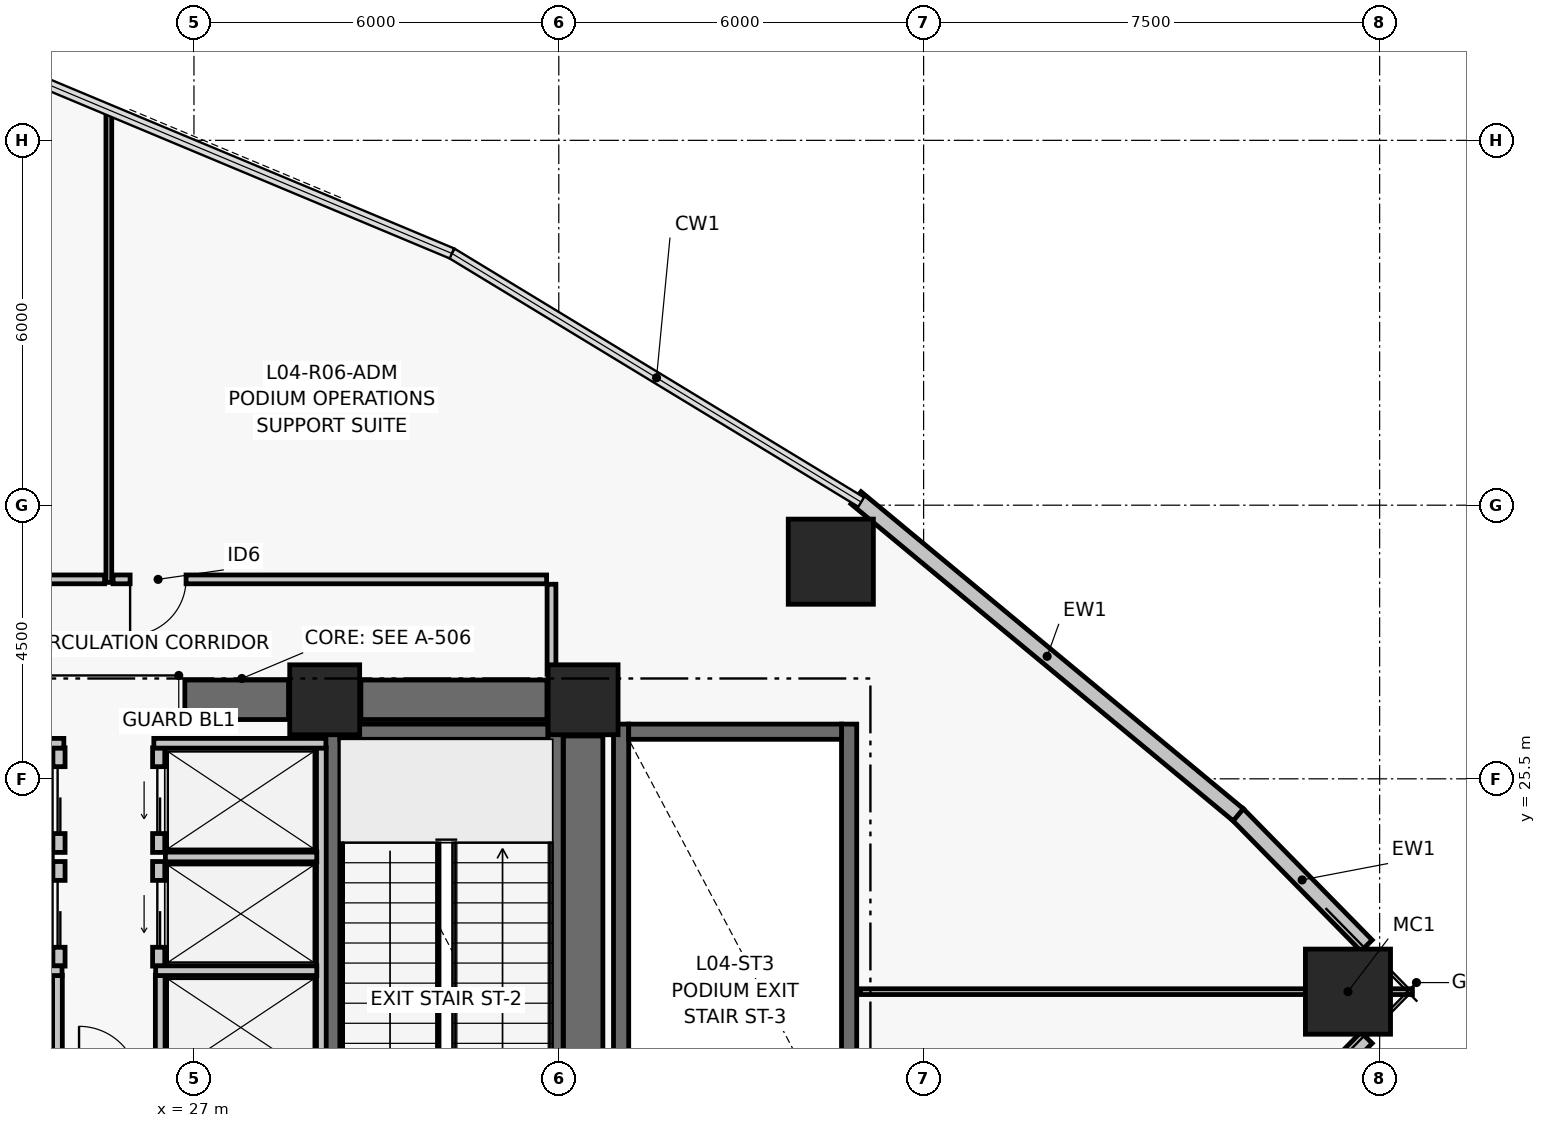
"""IFC4 building model, lengths in metres.
Left out: names, types, materials, properties, quantities, classifications, styles, units other than length and angle.
Written with IfcOpenShell. Run it as: python <this file> out.ifc"""

import sys

from ifc_helpers import new_model, si_unit, direction, frame, frame_2d, origin, origin_2d, place, context, subcontext, project, spatial, rectangle, hollow_rectangle, extrude, element, fill, save


model = new_model("IFC4")
c1 = context("Model", 3, precision=1e-05, world=origin(), true_north=direction((0.0, 1.0)))
c2 = subcontext(c1, "Body", "Model", "MODEL_VIEW")
j1 = project(units=[si_unit("LENGTHUNIT", "METRE"), si_unit("PLANEANGLEUNIT", "RADIAN")], contexts=[c1])
p1 = place(None, origin())
s1 = spatial("IfcSite", under=j1, at=p1, CompositionType="ELEMENT")
p2 = place(p1, origin())
s2 = spatial("IfcBuilding", under=s1, at=p2, CompositionType="ELEMENT")
p3 = place(p2, frame((0.0, 0.0, 22.8)))
s3 = spatial("IfcBuildingStorey", under=s2, at=p3, CompositionType="ELEMENT", Elevation=22.8)
for number, where, z_axis, x_axis in (
    (1, (29.15, 26.8, 0.0), (0.0, 0.0, 1.0), (1.0, 0.0, 0.0)),
    (2, (33.4, 26.8, 0.0), (0.0, 0.0, 1.0), (1.0, 0.0, 0.0)),
):
    element("IfcColumn", number, at=place(p3, frame(where, z_axis=z_axis, x_axis=x_axis)), inside=s3, PredefinedType="COLUMN", context=c2, shape_type="SweptSolid", body=[
        extrude(rectangle(XDim=1.15, YDim=1.15, at=origin_2d()), origin(), (0.0, 0.0, 1.0), 4.8),
    ])
p4 = place(p3, frame((26.85, 26.8, 0.0), z_axis=(0.0, 0.0, 1.0), x_axis=(1.0, 0.0, 0.0)))
e3 = element("IfcWall", 3, at=p4, inside=s3, PredefinedType="SHEAR", context=c2, shape_type="SweptSolid", body=[
    extrude(rectangle(XDim=1.705, YDim=0.65, at=frame_2d((0.853, 0.0))), origin(), (0.0, 0.0, 1.0), 4.55),
])
p5 = place(p3, frame((29.745, 26.8, 0.0), z_axis=(0.0, 0.0, 1.0), x_axis=(1.0, 0.0, 0.0)))
e4 = element("IfcWall", 4, at=p5, inside=s3, PredefinedType="SHEAR", context=c2, shape_type="SweptSolid", body=[
    extrude(rectangle(XDim=3.06, YDim=0.65, at=frame_2d((1.53, 0.0))), origin(), (0.0, 0.0, 1.0), 4.55),
])
p6 = place(p3, frame((33.4, 17.795, 0.0), z_axis=(0.0, 0.0, 1.0), x_axis=(0.0, 1.0, 0.0)))
e5 = element("IfcWall", 5, at=p6, inside=s3, PredefinedType="SHEAR", context=c2, shape_type="SweptSolid", body=[
    extrude(rectangle(XDim=8.41, YDim=0.65, at=frame_2d((4.205, 0.0))), origin(), (0.0, 0.0, 1.0), 4.55),
])
p7 = place(p3, frame((29.275, 17.6, 0.0), z_axis=(0.0, 0.0, 1.0), x_axis=(0.0, 1.0, 0.0)))
e6 = element("IfcWall", 6, at=p7, inside=s3, PredefinedType="SHEAR", context=c2, shape_type="SweptSolid", body=[
    extrude(rectangle(XDim=8.8, YDim=0.25, at=frame_2d((4.4, 0.0))), origin(), (0.0, 0.0, 1.0), 4.55),
])
p8 = place(p7, frame((0.35, 0.0, 0.0)))
e7 = element("IfcOpeningElement", 7, at=p8, cuts=e6, PredefinedType="OPENING", context=c2, shape_type="SweptSolid", body=[
    extrude(rectangle(XDim=1.05, YDim=2.08, at=frame_2d((0.525, 1.04))), frame((0.0, 0.135, 0.0), z_axis=(0.0, -1.0, 0.0), x_axis=(1.0, 0.0, 0.0)), (0.0, 0.0, 1.0), 0.27),
])
p9 = place(p3, frame((32.946, 17.6, 0.0), z_axis=(0.0, 0.0, 1.0), x_axis=(0.0, 1.0, 0.0)))
e8 = element("IfcWall", 8, at=p9, inside=s3, PredefinedType="SHEAR", context=c2, shape_type="SweptSolid", body=[
    extrude(rectangle(XDim=8.8, YDim=0.25, at=frame_2d((4.4, 0.0))), origin(), (0.0, 0.0, 1.0), 4.55),
])
p10 = place(p3, frame((29.4, 26.275, 0.0), z_axis=(0.0, 0.0, 1.0), x_axis=(1.0, 0.0, 0.0)))
e9 = element("IfcWall", 9, at=p10, inside=s3, PredefinedType="SHEAR", context=c2, shape_type="SweptSolid", body=[
    extrude(rectangle(XDim=3.421, YDim=0.25, at=frame_2d((1.71, 0.0))), origin(), (0.0, 0.0, 1.0), 4.55),
])
for number, where, z_axis, x_axis in (
    (10, (34.025, 17.6, 0.0), (0.0, 0.0, 1.0), (0.0, 1.0, 0.0)),
    (11, (37.775, 17.6, 0.0), (0.0, 0.0, 1.0), (0.0, 1.0, 0.0)),
):
    element("IfcWall", number, at=place(p3, frame(where, z_axis=z_axis, x_axis=x_axis)), inside=s3, PredefinedType="SHEAR", context=c2, shape_type="SweptSolid", body=[
        extrude(rectangle(XDim=8.8, YDim=0.25, at=frame_2d((4.4, 0.0))), origin(), (0.0, 0.0, 1.0), 4.55),
    ])
p11 = place(p3, frame((34.15, 26.275, 0.0), z_axis=(0.0, 0.0, 1.0), x_axis=(1.0, 0.0, 0.0)))
e12 = element("IfcWall", 12, at=p11, inside=s3, PredefinedType="SHEAR", context=c2, shape_type="SweptSolid", body=[
    extrude(rectangle(XDim=3.5, YDim=0.25, at=frame_2d((1.75, 0.0))), origin(), (0.0, 0.0, 1.0), 4.55),
])
for number, where, z_axis, x_axis in (
    (13, (45.979, 22.0, 0.0), (0.0, 0.0, 1.0), (1.0, 0.0, 0.0)),
    (14, (37.474, 29.071, 0.0), (0.0, 0.0, 1.0), (1.0, 0.0, 0.0)),
):
    element("IfcColumn", number, at=place(p3, frame(where, z_axis=z_axis, x_axis=x_axis)), inside=s3, PredefinedType="COLUMN", context=c2, shape_type="SweptSolid", body=[
        extrude(hollow_rectangle(XDim=1.4, YDim=1.4, WallThickness=0.055, at=origin_2d()), origin(), (0.0, 0.0, 1.0), 4.8),
    ])
for number, where, z_axis, x_axis in (
    (15, (46.285, 21.242, 0.0), (0.0, 0.0, 1.0), (-0.701, -0.714, 0.0)),
    (16, (44.166, 24.916, 0.0), (0.0, 0.0, 1.0), (0.701, -0.714, 0.0)),
):
    element("IfcWall", number, at=place(p3, frame(where, z_axis=z_axis, x_axis=x_axis)), inside=s3, PredefinedType="PARTITIONING", context=c2, shape_type="SweptSolid", body=[
        extrude(rectangle(XDim=3.024, YDim=0.26, at=frame_2d((1.512, 0.0))), origin(), (0.0, 0.0, 1.0), 4.55),
    ])
p12 = place(p3, frame((37.888, 30.121, 0.0), z_axis=(0.0, 0.0, 1.0), x_axis=(0.769752944783, -0.638341917782, 0.0)))
e17 = element("IfcWall", 17, at=p12, inside=s3, PredefinedType="PARTITIONING", context=c2, shape_type="SweptSolid", body=[
    extrude(rectangle(XDim=8.167, YDim=0.26, at=frame_2d((4.083, 0.0))), origin(), (0.0, 0.0, 1.0), 4.55),
])
p13 = place(p3, frame((24.78, 22.42, 0.0), z_axis=(0.0, 0.0, 1.0), x_axis=(0.0, 1.0, 0.0)))
e18 = element("IfcWall", 18, at=p13, inside=s3, PredefinedType="PARTITIONING", context=c2, shape_type="SweptSolid", body=[
    extrude(rectangle(XDim=1.72, YDim=0.2, at=frame_2d((0.86, 0.0))), origin(), (0.0, 0.0, 1.0), 4.55),
])
p14 = place(p13, frame((0.31, 0.0, 0.0)))
e19 = element("IfcOpeningElement", 19, at=p14, cuts=e18, PredefinedType="OPENING", context=c2, shape_type="SweptSolid", body=[
    extrude(rectangle(XDim=1.1, YDim=2.08, at=frame_2d((0.55, 1.04))), frame((0.0, 0.11, 0.0), z_axis=(0.0, -1.0, 0.0), x_axis=(1.0, 0.0, 0.0)), (0.0, 0.0, 1.0), 0.22),
])
p15 = place(p3, frame((24.78, 24.29, 0.0), z_axis=(0.0, 0.0, 1.0), x_axis=(0.0, 1.0, 0.0)))
e20 = element("IfcWall", 20, at=p15, inside=s3, PredefinedType="PARTITIONING", context=c2, shape_type="SweptSolid", body=[
    extrude(rectangle(XDim=1.72, YDim=0.2, at=frame_2d((0.86, 0.0))), origin(), (0.0, 0.0, 1.0), 4.55),
])
p16 = place(p15, frame((0.31, 0.0, 0.0)))
e21 = element("IfcOpeningElement", 21, at=p16, cuts=e20, PredefinedType="OPENING", context=c2, shape_type="SweptSolid", body=[
    extrude(rectangle(XDim=1.1, YDim=2.08, at=frame_2d((0.55, 1.04))), frame((0.0, 0.11, 0.0), z_axis=(0.0, -1.0, 0.0), x_axis=(1.0, 0.0, 0.0)), (0.0, 0.0, 1.0), 0.22),
])
p17 = place(p3, frame((26.42, 22.42, 0.0), z_axis=(0.0, 0.0, 1.0), x_axis=(0.0, 1.0, 0.0)))
e22 = element("IfcWall", 22, at=p17, inside=s3, PredefinedType="PARTITIONING", context=c2, shape_type="SweptSolid", body=[
    extrude(rectangle(XDim=1.72, YDim=0.2, at=frame_2d((0.86, 0.0))), origin(), (0.0, 0.0, 1.0), 4.55),
])
p18 = place(p17, frame((0.31, 0.0, 0.0)))
e23 = element("IfcOpeningElement", 23, at=p18, cuts=e22, PredefinedType="OPENING", context=c2, shape_type="SweptSolid", body=[
    extrude(rectangle(XDim=1.1, YDim=2.08, at=frame_2d((0.55, 1.04))), frame((0.0, 0.11, 0.0), z_axis=(0.0, -1.0, 0.0), x_axis=(1.0, 0.0, 0.0)), (0.0, 0.0, 1.0), 0.22),
])
p19 = place(p3, frame((26.42, 24.29, 0.0), z_axis=(0.0, 0.0, 1.0), x_axis=(0.0, 1.0, 0.0)))
e24 = element("IfcWall", 24, at=p19, inside=s3, PredefinedType="PARTITIONING", context=c2, shape_type="SweptSolid", body=[
    extrude(rectangle(XDim=1.72, YDim=0.2, at=frame_2d((0.86, 0.0))), origin(), (0.0, 0.0, 1.0), 4.55),
])
p20 = place(p19, frame((0.31, 0.0, 0.0)))
e25 = element("IfcOpeningElement", 25, at=p20, cuts=e24, PredefinedType="OPENING", context=c2, shape_type="SweptSolid", body=[
    extrude(rectangle(XDim=1.1, YDim=2.08, at=frame_2d((0.55, 1.04))), frame((0.0, 0.11, 0.0), z_axis=(0.0, -1.0, 0.0), x_axis=(1.0, 0.0, 0.0)), (0.0, 0.0, 1.0), 0.22),
])
p21 = place(p3, frame((24.755, 20.56, 0.0), z_axis=(0.0, 0.0, 1.0), x_axis=(0.0, 1.0, 0.0)))
e26 = element("IfcWall", 26, at=p21, inside=s3, PredefinedType="PARTITIONING", context=c2, shape_type="SweptSolid", body=[
    extrude(rectangle(XDim=1.71, YDim=0.16, at=frame_2d((0.855, 0.0))), origin(), (0.0, 0.0, 1.0), 4.55),
])
p22 = place(p3, frame((22.18, 22.345, 0.0), z_axis=(0.0, 0.0, 1.0), x_axis=(1.0, 0.0, 0.0)))
e27 = element("IfcWall", 27, at=p22, inside=s3, PredefinedType="PARTITIONING", context=c2, shape_type="SweptSolid", body=[
    extrude(rectangle(XDim=2.65, YDim=0.16, at=frame_2d((1.325, 0.0))), origin(), (0.0, 0.0, 1.0), 4.55),
])
p23 = place(p3, frame((22.18, 24.215, 0.0), z_axis=(0.0, 0.0, 1.0), x_axis=(1.0, 0.0, 0.0)))
e28 = element("IfcWall", 28, at=p23, inside=s3, PredefinedType="PARTITIONING", context=c2, shape_type="SweptSolid", body=[
    extrude(rectangle(XDim=2.49, YDim=0.16, at=frame_2d((1.245, 0.0))), origin(), (0.0, 0.0, 1.0), 4.55),
])
p24 = place(p3, frame((22.03, 26.085, 0.0), z_axis=(0.0, 0.0, 1.0), x_axis=(1.0, 0.0, 0.0)))
e29 = element("IfcWall", 29, at=p24, inside=s3, PredefinedType="PARTITIONING", context=c2, shape_type="SweptSolid", body=[
    extrude(rectangle(XDim=2.83, YDim=0.16, at=frame_2d((1.415, 0.0))), origin(), (0.0, 0.0, 1.0), 4.55),
])
p25 = place(p3, frame((29.095, 20.56, 0.0), z_axis=(0.0, 0.0, 1.0), x_axis=(0.0, 1.0, 0.0)))
e30 = element("IfcWall", 30, at=p25, inside=s3, PredefinedType="PARTITIONING", context=c2, shape_type="SweptSolid", body=[
    extrude(rectangle(XDim=5.45, YDim=0.16, at=frame_2d((2.725, 0.0))), origin(), (0.0, 0.0, 1.0), 4.55),
])
p26 = place(p3, frame((26.445, 20.56, 0.0), z_axis=(0.0, 0.0, 1.0), x_axis=(0.0, 1.0, 0.0)))
e31 = element("IfcWall", 31, at=p26, inside=s3, PredefinedType="PARTITIONING", context=c2, shape_type="SweptSolid", body=[
    extrude(rectangle(XDim=1.71, YDim=0.16, at=frame_2d((0.855, 0.0))), origin(), (0.0, 0.0, 1.0), 4.55),
])
p27 = place(p3, frame((26.37, 22.345, 0.0), z_axis=(0.0, 0.0, 1.0), x_axis=(1.0, 0.0, 0.0)))
e32 = element("IfcWall", 32, at=p27, inside=s3, PredefinedType="PARTITIONING", context=c2, shape_type="SweptSolid", body=[
    extrude(rectangle(XDim=2.65, YDim=0.16, at=frame_2d((1.325, 0.0))), origin(), (0.0, 0.0, 1.0), 4.55),
])
p28 = place(p3, frame((26.53, 24.215, 0.0), z_axis=(0.0, 0.0, 1.0), x_axis=(1.0, 0.0, 0.0)))
e33 = element("IfcWall", 33, at=p28, inside=s3, PredefinedType="PARTITIONING", context=c2, shape_type="SweptSolid", body=[
    extrude(rectangle(XDim=2.49, YDim=0.16, at=frame_2d((1.245, 0.0))), origin(), (0.0, 0.0, 1.0), 4.55),
])
p29 = place(p3, frame((26.34, 26.085, 0.0), z_axis=(0.0, 0.0, 1.0), x_axis=(1.0, 0.0, 0.0)))
e34 = element("IfcWall", 34, at=p29, inside=s3, PredefinedType="PARTITIONING", context=c2, shape_type="SweptSolid", body=[
    extrude(rectangle(XDim=2.83, YDim=0.16, at=frame_2d((1.415, 0.0))), origin(), (0.0, 0.0, 1.0), 4.55),
])
p30 = place(p3, frame((33.74, 27.22, 0.0), z_axis=(0.0, 0.0, 1.0), x_axis=(-1.0, 0.0, 0.0)))
e35 = element("IfcWall", 35, at=p30, inside=s3, PredefinedType="PARTITIONING", context=c2, shape_type="SweptSolid", body=[
    extrude(rectangle(XDim=0.86, YDim=0.145, at=frame_2d((0.43, 0.0))), origin(), (0.0, 0.0, 1.0), 3.13),
])
p31 = place(p3, frame((32.88, 27.22, 0.0), z_axis=(0.0, 0.0, 1.0), x_axis=(0.0, 1.0, 0.0)))
e36 = element("IfcWall", 36, at=p31, inside=s3, PredefinedType="PARTITIONING", context=c2, shape_type="SweptSolid", body=[
    extrude(rectangle(XDim=1.48, YDim=0.145, at=frame_2d((0.74, 0.0))), origin(), (0.0, 0.0, 1.0), 3.68),
])
p32 = place(p3, frame((32.8, 28.78, 0.0), z_axis=(0.0, 0.0, 1.0), x_axis=(-1.0, 0.0, 0.0)))
e37 = element("IfcWall", 37, at=p32, inside=s3, PredefinedType="PARTITIONING", context=c2, shape_type="SweptSolid", body=[
    extrude(rectangle(XDim=7.13, YDim=0.145, at=frame_2d((3.565, 0.0))), origin(), (0.0, 0.0, 1.0), 4.55),
])
p33 = place(p32, frame((5.93, 0.0, 0.0)))
e38 = element("IfcOpeningElement", 38, at=p33, cuts=e37, PredefinedType="OPENING", context=c2, shape_type="SweptSolid", body=[
    extrude(rectangle(XDim=0.92, YDim=2.05, at=frame_2d((0.46, 1.025))), frame((0.0, 0.083, 0.0), z_axis=(0.0, -1.0, 0.0), x_axis=(1.0, 0.0, 0.0)), (0.0, 0.0, 1.0), 0.165),
])
p34 = place(p3, frame((25.53, 28.78, 0.0), z_axis=(0.0, 0.0, 1.0), x_axis=(-1.0, 0.0, 0.0)))
e39 = element("IfcWall", 39, at=p34, inside=s3, PredefinedType="PARTITIONING", context=c2, shape_type="SweptSolid", body=[
    extrude(rectangle(XDim=9.63, YDim=0.145, at=frame_2d((4.815, 0.0))), origin(), (0.0, 0.0, 1.0), 3.13),
])
p35 = place(p3, frame((25.6, 28.73, 0.0), z_axis=(0.0, 0.0, 1.0), x_axis=(0.0, 1.0, 0.0)))
e40 = element("IfcWall", 40, at=p35, inside=s3, PredefinedType="PARTITIONING", context=c2, shape_type="SweptSolid", body=[
    extrude(rectangle(XDim=7.781, YDim=0.095, at=frame_2d((3.891, 0.0))), origin(), (0.0, 0.0, 1.0), 3.93),
])
p36 = place(p3, frame((37.96, 22.0, 0.0), z_axis=(0.0, 0.0, 1.0), x_axis=(1.0, 0.0, 0.0)))
e41 = element("IfcWall", 41, at=p36, inside=s3, PredefinedType="PARTITIONING", context=c2, shape_type="SweptSolid", body=[
    extrude(rectangle(XDim=9.079, YDim=0.095, at=frame_2d((4.54, 0.0))), origin(), (0.0, 0.0, 1.0), 3.13),
])
p37 = place(p14, origin())
e42 = element("IfcDoor", 42, at=p37, inside=s3, OperationType="DOUBLE_DOOR_SLIDING", PredefinedType="DOOR", context=c2, shape_type="SweptSolid", body=[
    extrude(rectangle(XDim=1.1, YDim=2.08, at=frame_2d((0.55, 1.04))), frame((0.0, 0.025, 0.0), z_axis=(0.0, -1.0, 0.0), x_axis=(1.0, 0.0, 0.0)), (0.0, 0.0, 1.0), 0.05),
])
fill(e19, e42)
p38 = place(p16, origin())
e43 = element("IfcDoor", 43, at=p38, inside=s3, OperationType="DOUBLE_DOOR_SLIDING", PredefinedType="DOOR", context=c2, shape_type="SweptSolid", body=[
    extrude(rectangle(XDim=1.1, YDim=2.08, at=frame_2d((0.55, 1.04))), frame((0.0, 0.025, 0.0), z_axis=(0.0, -1.0, 0.0), x_axis=(1.0, 0.0, 0.0)), (0.0, 0.0, 1.0), 0.05),
])
fill(e21, e43)
p39 = place(p18, origin())
e44 = element("IfcDoor", 44, at=p39, inside=s3, OperationType="DOUBLE_DOOR_SLIDING", PredefinedType="DOOR", context=c2, shape_type="SweptSolid", body=[
    extrude(rectangle(XDim=1.1, YDim=2.08, at=frame_2d((0.55, 1.04))), frame((0.0, 0.025, 0.0), z_axis=(0.0, -1.0, 0.0), x_axis=(1.0, 0.0, 0.0)), (0.0, 0.0, 1.0), 0.05),
])
fill(e23, e44)
p40 = place(p20, origin())
e45 = element("IfcDoor", 45, at=p40, inside=s3, OperationType="DOUBLE_DOOR_SLIDING", PredefinedType="DOOR", context=c2, shape_type="SweptSolid", body=[
    extrude(rectangle(XDim=1.1, YDim=2.08, at=frame_2d((0.55, 1.04))), frame((0.0, 0.025, 0.0), z_axis=(0.0, -1.0, 0.0), x_axis=(1.0, 0.0, 0.0)), (0.0, 0.0, 1.0), 0.05),
])
fill(e25, e45)
p41 = place(p33, origin())
e46 = element("IfcDoor", 46, at=p41, inside=s3, OperationType="SINGLE_SWING_RIGHT", PredefinedType="DOOR", context=c2, shape_type="SweptSolid", body=[
    extrude(rectangle(XDim=0.92, YDim=2.05, at=frame_2d((0.46, 1.025))), frame((0.0, 0.025, 0.0), z_axis=(0.0, -1.0, 0.0), x_axis=(1.0, 0.0, 0.0)), (0.0, 0.0, 1.0), 0.05),
])
fill(e38, e46)
save(model, sys.argv[1])
